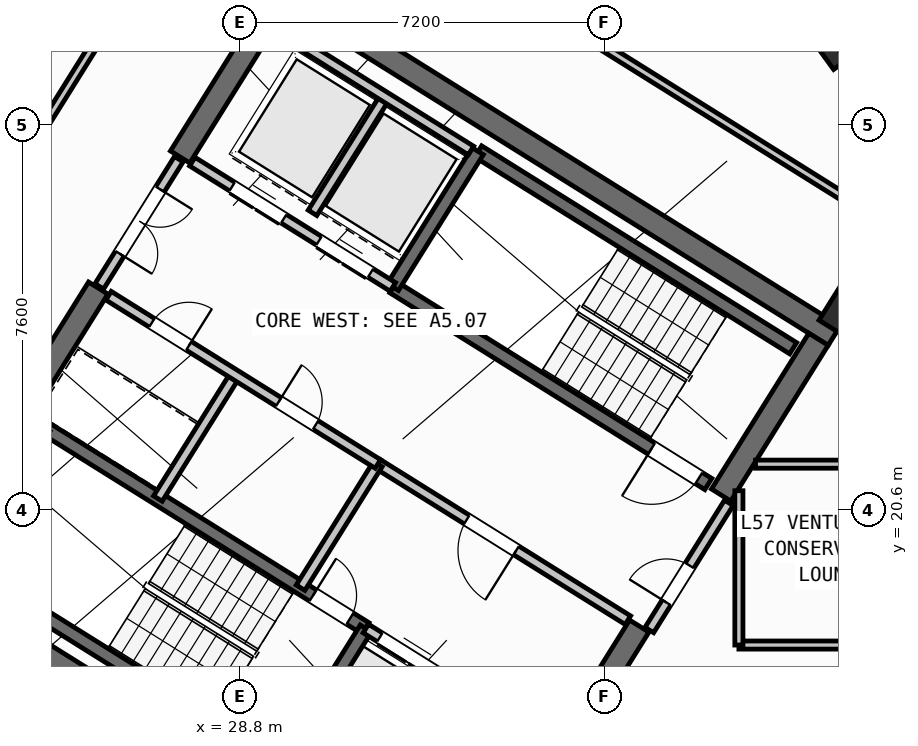
"""IFC4 building model, lengths in metres.
Left out: names, types, materials, properties, quantities, classifications, styles, units other than length and angle.
Written with IfcOpenShell. Run it as: python <this file> out.ifc"""

import sys

from ifc_helpers import new_model, si_unit, direction, frame, frame_2d, origin, origin_2d, place, context, subcontext, project, spatial, rectangle, hollow_rectangle, i_section, extrude, source, transform, mapped, element, fill, save


model = new_model("IFC4")
c1 = context("Model", 3, precision=1e-05, world=origin(), true_north=direction((0.0, 1.0)))
c2 = subcontext(c1, "Body", "Model", "MODEL_VIEW")
j1 = project(units=[si_unit("LENGTHUNIT", "METRE"), si_unit("PLANEANGLEUNIT", "RADIAN")], contexts=[c1])
p1 = place(None, origin())
s1 = spatial("IfcSite", under=j1, at=p1, CompositionType="ELEMENT")
p2 = place(p1, origin())
s2 = spatial("IfcBuilding", under=s1, at=p2, CompositionType="ELEMENT")
p3 = place(p2, frame((0.0, 0.0, 225.6)))
s3 = spatial("IfcBuildingStorey", under=s2, at=p3, CompositionType="ELEMENT", Elevation=225.6)
p4 = place(p3, frame((40.531, 24.036, 0.0), z_axis=(0.0, 0.0, 1.0), x_axis=(-0.848048787466, 0.529918157905, 0.0)))
e1 = element("IfcWall", 1, at=p4, inside=s3, PredefinedType="SHEAR", context=c2, shape_type="SweptSolid", body=[
    extrude(rectangle(XDim=13.04, YDim=0.45, at=frame_2d((6.52, 0.0))), origin(), (0.0, 0.0, 1.0), 3.35),
])
p5 = place(p3, frame((33.324, 12.503, 0.0), z_axis=(0.0, 0.0, 1.0), x_axis=(-0.848043529849, 0.529926571782, 0.0)))
e2 = element("IfcWall", 2, at=p5, inside=s3, PredefinedType="SHEAR", context=c2, shape_type="SweptSolid", body=[
    extrude(rectangle(XDim=13.04, YDim=0.45, at=frame_2d((6.52, 0.0))), origin(), (0.0, 0.0, 1.0), 3.35),
])
p6 = place(p3, frame((40.221, 23.965, 0.0), z_axis=(0.0, 0.0, 1.0), x_axis=(-0.529902075036, -0.848058836916, 0.0)))
e3 = element("IfcWall", 3, at=p6, inside=s3, PredefinedType="SHEAR", context=c2, shape_type="SweptSolid", body=[
    extrude(rectangle(XDim=3.625, YDim=0.45, at=frame_2d((1.812, 0.0))), origin(), (0.0, 0.0, 1.0), 3.35),
])
p7 = place(p3, frame((36.683, 18.304, 0.0), z_axis=(0.0, 0.0, 1.0), x_axis=(-0.529904039071, -0.848057609704, 0.0)))
e4 = element("IfcWall", 4, at=p7, inside=s3, PredefinedType="SHEAR", context=c2, shape_type="SweptSolid", body=[
    extrude(rectangle(XDim=6.475, YDim=0.45, at=frame_2d((3.238, 0.0))), origin(), (0.0, 0.0, 1.0), 3.35),
])
p8 = place(p3, frame((29.544, 30.636, 0.0), z_axis=(0.0, 0.0, 1.0), x_axis=(-0.529902075036, -0.848058836916, 0.0)))
e5 = element("IfcWall", 5, at=p8, inside=s3, PredefinedType="SHEAR", context=c2, shape_type="SweptSolid", body=[
    extrude(rectangle(XDim=3.625, YDim=0.45, at=frame_2d((1.812, 0.0))), origin(), (0.0, 0.0, 1.0), 3.35),
])
p9 = place(p3, frame((26.007, 24.976, 0.0), z_axis=(0.0, 0.0, 1.0), x_axis=(-0.529931155655, -0.848040665456, 0.0)))
e6 = element("IfcWall", 6, at=p9, inside=s3, PredefinedType="SHEAR", context=c2, shape_type="SweptSolid", body=[
    extrude(rectangle(XDim=6.475, YDim=0.45, at=frame_2d((3.238, 0.0))), origin(), (0.0, 0.0, 1.0), 3.35),
])
m1 = source(origin(), c2, "Body", "SweptSolid", [
    extrude(hollow_rectangle(XDim=0.8, YDim=0.8, WallThickness=0.032, at=origin_2d()), origin(), (0.0, 0.0, 1.0), 3.6),
])
p10 = place(p3, frame((40.783, 24.469, 0.0), z_axis=(0.0, 0.0, 1.0), x_axis=(-0.848048096156, 0.529919264233, 0.0)))
e7 = element("IfcColumn", 7, at=p10, inside=s3, PredefinedType="COLUMN", context=c2, shape_type="MappedRepresentation", body=[
    mapped(m1, transform((0.0, 0.0, 0.0), scale=1.0)),
])
m2 = source(origin(), c2, "Body", "SweptSolid", [
    extrude(i_section(OverallWidth=0.3, OverallDepth=0.55, WebThickness=0.015, FlangeThickness=0.029, at=origin_2d()), origin(), (0.0, 0.0, 1.0), 3.6),
])
p11 = place(p3, frame((40.479, 29.601, 0.0), z_axis=(0.0, 0.0, 1.0), x_axis=(0.809016994375, 0.587785252292, 0.0)))
e8 = element("IfcColumn", 8, at=p11, inside=s3, PredefinedType="COLUMN", context=c2, shape_type="MappedRepresentation", body=[
    mapped(m2, transform((0.0, 0.0, 0.0), scale=1.0)),
])
p12 = place(p3, frame((31.76, 12.183, 0.0), z_axis=(0.0, 0.0, 1.0), x_axis=(-0.848047074256, 0.529920899612, 0.0)))
e9 = element("IfcWall", 9, at=p12, inside=s3, PredefinedType="STANDARD", context=c2, shape_type="SweptSolid", body=[
    extrude(rectangle(XDim=30.652, YDim=0.32, at=frame_2d((15.326, 0.0))), origin(), (0.0, 0.0, 1.0), 3.35),
])
p13 = place(p12, frame((15.166, 0.0, 0.0)))
e10 = element("IfcOpeningElement", 10, at=p13, cuts=e9, PredefinedType="OPENING", context=c2, shape_type="SweptSolid", body=[
    extrude(rectangle(XDim=1.2, YDim=2.15, at=frame_2d((0.6, 1.075))), frame((0.0, 0.17, 0.0), z_axis=(0.0, -1.0, 0.0), x_axis=(1.0, 0.0, 0.0)), (0.0, 0.0, 1.0), 0.34),
])
p14 = place(p12, frame((2.24, 0.0, 0.9)))
e11 = element("IfcOpeningElement", 11, at=p14, cuts=e9, PredefinedType="OPENING", context=c2, shape_type="SweptSolid", body=[
    extrude(rectangle(XDim=1.65, YDim=1.45, at=frame_2d((0.825, 0.725))), frame((0.0, 0.17, 0.0), z_axis=(0.0, -1.0, 0.0), x_axis=(1.0, 0.0, 0.0)), (0.0, 0.0, 1.0), 0.34),
])
p15 = place(p12, frame((7.469, 0.0, 0.9)))
e12 = element("IfcOpeningElement", 12, at=p15, cuts=e9, PredefinedType="OPENING", context=c2, shape_type="SweptSolid", body=[
    extrude(rectangle(XDim=1.65, YDim=1.45, at=frame_2d((0.825, 0.725))), frame((0.0, 0.17, 0.0), z_axis=(0.0, -1.0, 0.0), x_axis=(1.0, 0.0, 0.0)), (0.0, 0.0, 1.0), 0.34),
])
p16 = place(p12, frame((12.623, 0.0, 1.0)))
e13 = element("IfcOpeningElement", 13, at=p16, cuts=e9, PredefinedType="OPENING", context=c2, shape_type="SweptSolid", body=[
    extrude(rectangle(XDim=0.9, YDim=1.25, at=frame_2d((0.45, 0.625))), frame((0.0, 0.17, 0.0), z_axis=(0.0, -1.0, 0.0), x_axis=(1.0, 0.0, 0.0)), (0.0, 0.0, 1.0), 0.34),
])
p17 = place(p12, frame((19.556, 0.0, 1.0)))
e14 = element("IfcOpeningElement", 14, at=p17, cuts=e9, PredefinedType="OPENING", context=c2, shape_type="SweptSolid", body=[
    extrude(rectangle(XDim=0.9, YDim=1.25, at=frame_2d((0.45, 0.625))), frame((0.0, 0.17, 0.0), z_axis=(0.0, -1.0, 0.0), x_axis=(1.0, 0.0, 0.0)), (0.0, 0.0, 1.0), 0.34),
])
p18 = place(p12, frame((21.95, 0.0, 1.0)))
e15 = element("IfcOpeningElement", 15, at=p18, cuts=e9, PredefinedType="OPENING", context=c2, shape_type="SweptSolid", body=[
    extrude(rectangle(XDim=0.9, YDim=1.25, at=frame_2d((0.45, 0.625))), frame((0.0, 0.17, 0.0), z_axis=(0.0, -1.0, 0.0), x_axis=(1.0, 0.0, 0.0)), (0.0, 0.0, 1.0), 0.34),
])
p19 = place(p12, frame((26.983, 0.0, 0.9)))
e16 = element("IfcOpeningElement", 16, at=p19, cuts=e9, PredefinedType="OPENING", context=c2, shape_type="SweptSolid", body=[
    extrude(rectangle(XDim=1.35, YDim=1.45, at=frame_2d((0.675, 0.725))), frame((0.0, 0.17, 0.0), z_axis=(0.0, -1.0, 0.0), x_axis=(1.0, 0.0, 0.0)), (0.0, 0.0, 1.0), 0.34),
])
p20 = place(p3, frame((29.605, 15.581, 0.0), z_axis=(0.0, 0.0, 1.0), x_axis=(-0.848036911448, 0.529937163087, 0.0)))
e17 = element("IfcWall", 17, at=p20, inside=s3, PredefinedType="SHEAR", context=c2, shape_type="SweptSolid", body=[
    extrude(rectangle(XDim=7.46, YDim=0.26, at=frame_2d((3.73, 0.0))), origin(), (0.0, 0.0, 1.0), 3.35),
])
p21 = place(p3, frame((31.28, 18.261, 0.0), z_axis=(0.0, 0.0, 1.0), x_axis=(-0.848051618787, 0.529913626805, 0.0)))
e18 = element("IfcWall", 18, at=p21, inside=s3, PredefinedType="SHEAR", context=c2, shape_type="SweptSolid", body=[
    extrude(rectangle(XDim=7.46, YDim=0.26, at=frame_2d((3.73, 0.0))), origin(), (0.0, 0.0, 1.0), 3.35),
])
p22 = place(p21, frame((0.36, 0.0, 0.0)))
e19 = element("IfcOpeningElement", 19, at=p22, cuts=e18, PredefinedType="OPENING", context=c2, shape_type="SweptSolid", body=[
    extrude(rectangle(XDim=0.86, YDim=2.05, at=frame_2d((0.43, 1.025))), frame((0.0, 0.14, 0.0), z_axis=(0.0, -1.0, 0.0), x_axis=(1.0, 0.0, 0.0)), (0.0, 0.0, 1.0), 0.28),
])
p23 = place(p3, frame((31.288, 18.256, 0.0), z_axis=(0.0, 0.0, 1.0), x_axis=(-0.529943379326, -0.848033026897, 0.0)))
e20 = element("IfcWall", 20, at=p23, inside=s3, PredefinedType="SHEAR", context=c2, shape_type="SweptSolid", body=[
    extrude(rectangle(XDim=3.16, YDim=0.26, at=frame_2d((1.58, 0.0))), origin(), (0.0, 0.0, 1.0), 3.35),
])
p24 = place(p3, frame((39.721, 23.788, 0.0), z_axis=(0.0, 0.0, 1.0), x_axis=(-0.848054434086, 0.529909121291, 0.0)))
e21 = element("IfcWall", 21, at=p24, inside=s3, PredefinedType="SHEAR", context=c2, shape_type="SweptSolid", body=[
    extrude(rectangle(XDim=7.33, YDim=0.26, at=frame_2d((3.665, 0.0))), origin(), (0.0, 0.0, 1.0), 3.35),
])
p25 = place(p3, frame((38.046, 21.108, 0.0), z_axis=(0.0, 0.0, 1.0), x_axis=(-0.848054434086, 0.529909121291, 0.0)))
e22 = element("IfcWall", 22, at=p25, inside=s3, PredefinedType="SHEAR", context=c2, shape_type="SweptSolid", body=[
    extrude(rectangle(XDim=7.33, YDim=0.26, at=frame_2d((3.665, 0.0))), origin(), (0.0, 0.0, 1.0), 3.35),
])
p26 = place(p25, frame((0.22, 0.0, 0.0)))
e23 = element("IfcOpeningElement", 23, at=p26, cuts=e22, PredefinedType="OPENING", context=c2, shape_type="SweptSolid", body=[
    extrude(rectangle(XDim=1.1, YDim=2.1, at=frame_2d((0.55, 1.05))), frame((0.0, 0.14, 0.0), z_axis=(0.0, -1.0, 0.0), x_axis=(1.0, 0.0, 0.0)), (0.0, 0.0, 1.0), 0.28),
])
p27 = place(p3, frame((33.496, 27.677, 0.0), z_axis=(0.0, 0.0, 1.0), x_axis=(-0.529908658664, -0.84805472316, 0.0)))
e24 = element("IfcWall", 24, at=p27, inside=s3, PredefinedType="SHEAR", context=c2, shape_type="SweptSolid", body=[
    extrude(rectangle(XDim=3.16, YDim=0.26, at=frame_2d((1.58, 0.0))), origin(), (0.0, 0.0, 1.0), 3.35),
])
p28 = place(p3, frame((34.933, 15.978, 0.0), z_axis=(0.0, 0.0, 1.0), x_axis=(-0.848055739377, 0.529907032327, 0.0)))
e25 = element("IfcWall", 25, at=p28, inside=s3, PredefinedType="STANDARD", context=c2, shape_type="SweptSolid", body=[
    extrude(rectangle(XDim=4.298, YDim=0.2, at=frame_2d((2.149, 0.0))), origin(), (0.0, 0.0, 1.0), 3.34),
])
p29 = place(p28, frame((0.448, 0.0, 0.0)))
e26 = element("IfcOpeningElement", 26, at=p29, cuts=e25, PredefinedType="OPENING", context=c2, shape_type="SweptSolid", body=[
    extrude(rectangle(XDim=1.3, YDim=2.2, at=frame_2d((0.65, 1.1))), frame((0.0, 0.11, 0.0), z_axis=(0.0, -1.0, 0.0), x_axis=(1.0, 0.0, 0.0)), (0.0, 0.0, 1.0), 0.22),
])
p30 = place(p28, frame((2.523, 0.0, 0.0)))
e27 = element("IfcOpeningElement", 27, at=p30, cuts=e25, PredefinedType="OPENING", context=c2, shape_type="SweptSolid", body=[
    extrude(rectangle(XDim=1.45, YDim=2.25, at=frame_2d((0.725, 1.125))), frame((0.0, 0.11, 0.0), z_axis=(0.0, -1.0, 0.0), x_axis=(1.0, 0.0, 0.0)), (0.0, 0.0, 1.0), 0.22),
])
p31 = place(p3, frame((36.459, 18.421, 0.0), z_axis=(0.0, 0.0, 1.0), x_axis=(-0.848059591691, 0.529900867089, 0.0)))
e28 = element("IfcWall", 28, at=p31, inside=s3, PredefinedType="STANDARD", context=c2, shape_type="SweptSolid", body=[
    extrude(rectangle(XDim=5.818, YDim=0.2, at=frame_2d((2.909, 0.0))), origin(), (0.0, 0.0, 1.0), 3.34),
])
p32 = place(p31, frame((2.598, 0.0, 0.0)))
e29 = element("IfcOpeningElement", 29, at=p32, cuts=e28, PredefinedType="OPENING", context=c2, shape_type="SweptSolid", body=[
    extrude(rectangle(XDim=1.15, YDim=2.1, at=frame_2d((0.575, 1.05))), frame((0.0, 0.11, 0.0), z_axis=(0.0, -1.0, 0.0), x_axis=(1.0, 0.0, 0.0)), (0.0, 0.0, 1.0), 0.22),
])
p33 = place(p3, frame((31.822, 24.998, 0.0), z_axis=(0.0, 0.0, 1.0), x_axis=(-0.848054125777, 0.529909614701, 0.0)))
e30 = element("IfcWall", 30, at=p33, inside=s3, PredefinedType="STANDARD", context=c2, shape_type="SweptSolid", body=[
    extrude(rectangle(XDim=4.668, YDim=0.2, at=frame_2d((2.334, 0.0))), origin(), (0.0, 0.0, 1.0), 3.34),
])
p34 = place(p33, frame((0.52, 0.0, 0.0)))
e31 = element("IfcOpeningElement", 31, at=p34, cuts=e30, PredefinedType="OPENING", context=c2, shape_type="SweptSolid", body=[
    extrude(rectangle(XDim=1.2, YDim=2.15, at=frame_2d((0.6, 1.075))), frame((0.0, 0.11, 0.0), z_axis=(0.0, -1.0, 0.0), x_axis=(1.0, 0.0, 0.0)), (0.0, 0.0, 1.0), 0.22),
])
p35 = place(p33, frame((2.54, 0.0, 0.0)))
e32 = element("IfcOpeningElement", 32, at=p35, cuts=e30, PredefinedType="OPENING", context=c2, shape_type="SweptSolid", body=[
    extrude(rectangle(XDim=1.2, YDim=2.15, at=frame_2d((0.6, 1.075))), frame((0.0, 0.11, 0.0), z_axis=(0.0, -1.0, 0.0), x_axis=(1.0, 0.0, 0.0)), (0.0, 0.0, 1.0), 0.22),
])
p36 = place(p3, frame((31.645, 28.716, 0.0), z_axis=(0.0, 0.0, 1.0), x_axis=(-0.52986693015, -0.848080795876, 0.0)))
e33 = element("IfcWall", 33, at=p36, inside=s3, PredefinedType="STANDARD", context=c2, shape_type="SweptSolid", body=[
    extrude(rectangle(XDim=2.66, YDim=0.2, at=frame_2d((1.33, 0.0))), origin(), (0.0, 0.0, 1.0), 3.34),
])
p37 = place(p3, frame((33.363, 27.69, 0.0), z_axis=(0.0, 0.0, 1.0), x_axis=(-0.84804957148, 0.529916903215, 0.0)))
e34 = element("IfcWall", 34, at=p37, inside=s3, PredefinedType="STANDARD", context=c2, shape_type="SweptSolid", body=[
    extrude(rectangle(XDim=4.548, YDim=0.2, at=frame_2d((2.274, 0.0))), origin(), (0.0, 0.0, 1.0), 3.34),
])
for number, where, z_axis, x_axis in (
    (35, (31.525, 21.504, 0.0), (0.0, 0.0, 1.0), (-0.53, -0.848, 0.0)),
    (36, (28.71, 23.263, 0.0), (0.0, 0.0, 1.0), (-0.53, -0.848, 0.0)),
):
    element("IfcWall", number, at=place(p3, frame(where, z_axis=z_axis, x_axis=x_axis)), inside=s3, PredefinedType="STANDARD", context=c2, shape_type="SweptSolid", body=[
        extrude(rectangle(XDim=2.88, YDim=0.2, at=frame_2d((1.44, 0.0))), origin(), (0.0, 0.0, 1.0), 3.34),
    ])
p38 = place(p3, frame((31.525, 21.504, 0.0), z_axis=(0.0, 0.0, 1.0), x_axis=(-0.848042066329, 0.529928913853, 0.0)))
e37 = element("IfcWall", 37, at=p38, inside=s3, PredefinedType="STANDARD", context=c2, shape_type="SweptSolid", body=[
    extrude(rectangle(XDim=6.268, YDim=0.2, at=frame_2d((3.134, 0.0))), origin(), (0.0, 0.0, 1.0), 3.34),
])
p39 = place(p38, frame((4.4, 0.0, 0.0)))
e38 = element("IfcOpeningElement", 38, at=p39, cuts=e37, PredefinedType="OPENING", context=c2, shape_type="SweptSolid", body=[
    extrude(rectangle(XDim=0.86, YDim=2.05, at=frame_2d((0.43, 1.025))), frame((0.0, 0.11, 0.0), z_axis=(0.0, -1.0, 0.0), x_axis=(1.0, 0.0, 0.0)), (0.0, 0.0, 1.0), 0.22),
])
p40 = place(p38, frame((1.45, 0.0, 0.0)))
e39 = element("IfcOpeningElement", 39, at=p40, cuts=e37, PredefinedType="OPENING", context=c2, shape_type="SweptSolid", body=[
    extrude(rectangle(XDim=0.86, YDim=2.05, at=frame_2d((0.43, 1.025))), frame((0.0, 0.11, 0.0), z_axis=(0.0, -1.0, 0.0), x_axis=(1.0, 0.0, 0.0)), (0.0, 0.0, 1.0), 0.22),
])
p41 = place(p3, frame((27.596, 27.52, 0.0), z_axis=(0.0, 0.0, 1.0), x_axis=(-0.529865479138, -0.848081702443, 0.0)))
e40 = element("IfcWall", 40, at=p41, inside=s3, PredefinedType="STANDARD", context=c2, shape_type="SweptSolid", body=[
    extrude(rectangle(XDim=2.96, YDim=0.2, at=frame_2d((1.48, 0.0))), origin(), (0.0, 0.0, 1.0), 3.34),
])
p42 = place(p41, frame((0.7, 0.0, 0.0)))
e41 = element("IfcOpeningElement", 41, at=p42, cuts=e40, PredefinedType="OPENING", context=c2, shape_type="SweptSolid", body=[
    extrude(rectangle(XDim=1.5, YDim=2.15, at=frame_2d((0.75, 1.075))), frame((0.0, 0.11, 0.0), z_axis=(0.0, -1.0, 0.0), x_axis=(1.0, 0.0, 0.0)), (0.0, 0.0, 1.0), 0.22),
])
p43 = place(p3, frame((31.239, 38.274, 0.0), z_axis=(0.0, 0.0, 1.0), x_axis=(-0.529921796515, -0.848046513806, 0.0)))
e42 = element("IfcWall", 42, at=p43, inside=s3, PredefinedType="PARTITIONING", context=c2, shape_type="SweptSolid", body=[
    extrude(rectangle(XDim=16.5, YDim=0.16, at=frame_2d((8.25, 0.0))), origin(), (0.0, 0.0, 1.0), 3.34),
])
p44 = place(p3, frame((41.936, 26.012, 0.0), z_axis=(0.0, 0.0, 1.0), x_axis=(-0.848051154596, 0.529914369676, 0.0)))
e43 = element("IfcWall", 43, at=p44, inside=s3, PredefinedType="PARTITIONING", context=c2, shape_type="SweptSolid", body=[
    extrude(rectangle(XDim=15.57, YDim=0.16, at=frame_2d((7.785, 0.0))), origin(), (0.0, 0.0, 1.0), 3.34),
])
p45 = place(p44, frame((10.83, 0.0, 0.0)))
e44 = element("IfcOpeningElement", 44, at=p45, cuts=e43, PredefinedType="OPENING", context=c2, shape_type="SweptSolid", body=[
    extrude(rectangle(XDim=1.0, YDim=2.1, at=frame_2d((0.5, 1.05))), frame((0.0, 0.09, 0.0), z_axis=(0.0, -1.0, 0.0), x_axis=(1.0, 0.0, 0.0)), (0.0, 0.0, 1.0), 0.18),
])
p46 = place(p3, frame((42.226, 28.873, 0.0), z_axis=(0.0, 0.0, 1.0), x_axis=(-0.848049134363, 0.529917602752, 0.0)))
e45 = element("IfcWall", 45, at=p46, inside=s3, PredefinedType="PLUMBINGWALL", context=c2, shape_type="SweptSolid", body=[
    extrude(rectangle(XDim=14.3, YDim=0.14, at=frame_2d((7.15, 0.0))), origin(), (0.0, 0.0, 1.0), 3.34),
])
p47 = place(p46, frame((9.57, 0.0, 0.0)))
e46 = element("IfcOpeningElement", 46, at=p47, cuts=e45, PredefinedType="OPENING", context=c2, shape_type="SweptSolid", body=[
    extrude(rectangle(XDim=0.92, YDim=2.08, at=frame_2d((0.46, 1.04))), frame((0.0, 0.08, 0.0), z_axis=(0.0, -1.0, 0.0), x_axis=(1.0, 0.0, 0.0)), (0.0, 0.0, 1.0), 0.16),
])
p48 = place(p3, frame((38.451, 20.737, 0.0), z_axis=(0.0, 0.0, 1.0), x_axis=(-0.529924799939, -0.848044637038, 0.0)))
e47 = element("IfcWall", 47, at=p48, inside=s3, PredefinedType="STANDARD", context=c2, shape_type="SweptSolid", body=[
    extrude(rectangle(XDim=2.96, YDim=0.2, at=frame_2d((1.48, 0.0))), origin(), (0.0, 0.0, 1.0), 3.34),
])
p49 = place(p48, frame((1.46, 0.0, 0.0)))
e48 = element("IfcOpeningElement", 48, at=p49, cuts=e47, PredefinedType="OPENING", context=c2, shape_type="SweptSolid", body=[
    extrude(rectangle(XDim=0.86, YDim=2.05, at=frame_2d((0.43, 1.025))), frame((0.0, 0.11, 0.0), z_axis=(0.0, -1.0, 0.0), x_axis=(1.0, 0.0, 0.0)), (0.0, 0.0, 1.0), 0.22),
])
p50 = place(p3, frame((38.65, 17.93, 0.0), z_axis=(0.0, 0.0, 1.0), x_axis=(1.0, 0.0, 0.0)))
e49 = element("IfcWall", 49, at=p50, inside=s3, PredefinedType="PARTITIONING", context=c2, shape_type="SweptSolid", body=[
    extrude(rectangle(XDim=9.95, YDim=0.16, at=frame_2d((4.975, 0.0))), origin(), (0.0, 0.0, 1.0), 3.34),
])
p51 = place(p50, frame((4.475, 0.0, 0.0)))
e50 = element("IfcOpeningElement", 50, at=p51, cuts=e49, PredefinedType="OPENING", context=c2, shape_type="SweptSolid", body=[
    extrude(rectangle(XDim=1.0, YDim=2.1, at=frame_2d((0.5, 1.05))), frame((0.0, 0.09, 0.0), z_axis=(0.0, -1.0, 0.0), x_axis=(1.0, 0.0, 0.0)), (0.0, 0.0, 1.0), 0.18),
])
p52 = place(p3, frame((38.65, 17.93, 0.0), z_axis=(0.0, 0.0, 1.0), x_axis=(0.0, 1.0, 0.0)))
e51 = element("IfcWall", 51, at=p52, inside=s3, PredefinedType="PARTITIONING", context=c2, shape_type="SweptSolid", body=[
    extrude(rectangle(XDim=3.046, YDim=0.16, at=frame_2d((1.523, 0.0))), origin(), (0.0, 0.0, 1.0), 3.34),
])
p53 = place(p3, frame((38.978, 21.5, 0.0), z_axis=(0.0, 0.0, 1.0), x_axis=(1.0, 0.0, 0.0)))
e52 = element("IfcWall", 52, at=p53, inside=s3, PredefinedType="PARTITIONING", context=c2, shape_type="SweptSolid", body=[
    extrude(rectangle(XDim=7.336, YDim=0.16, at=frame_2d((3.668, 0.0))), origin(), (0.0, 0.0, 1.0), 3.34),
])
m3 = source(origin(), c2, "Body", "SweptSolid", [
    extrude(rectangle(XDim=0.86, YDim=2.05, at=frame_2d((0.43, 1.025))), frame((0.0, 0.025, 0.0), z_axis=(0.0, -1.0, 0.0), x_axis=(1.0, 0.0, 0.0)), (0.0, 0.0, 1.0), 0.05),
])
p54 = place(p22, frame((0.86, 0.0, 0.0), z_axis=(0.0, 0.0, 1.0), x_axis=(-1.0, 0.0, 0.0)))
e53 = element("IfcDoor", 53, at=p54, inside=s3, OperationType="SINGLE_SWING_LEFT", PredefinedType="DOOR", context=c2, shape_type="MappedRepresentation", body=[
    mapped(m3, transform((0.0, 0.0, 0.0), scale=1.0)),
])
fill(e19, e53)
m4 = source(origin(), c2, "Body", "SweptSolid", [
    extrude(rectangle(XDim=1.1, YDim=2.1, at=frame_2d((0.55, 1.05))), frame((0.0, 0.025, 0.0), z_axis=(0.0, -1.0, 0.0), x_axis=(1.0, 0.0, 0.0)), (0.0, 0.0, 1.0), 0.05),
])
p55 = place(p26, origin())
e54 = element("IfcDoor", 54, at=p55, inside=s3, OperationType="SINGLE_SWING_RIGHT", PredefinedType="DOOR", context=c2, shape_type="MappedRepresentation", body=[
    mapped(m4, transform((0.0, 0.0, 0.0), scale=1.0)),
])
fill(e23, e54)
m5 = source(origin(), c2, "Body", "SweptSolid", [
    extrude(rectangle(XDim=1.15, YDim=2.1, at=frame_2d((0.575, 1.05))), frame((0.0, 0.025, 0.0), z_axis=(0.0, -1.0, 0.0), x_axis=(1.0, 0.0, 0.0)), (0.0, 0.0, 1.0), 0.05),
])
p56 = place(p32, origin())
e55 = element("IfcDoor", 55, at=p56, inside=s3, OperationType="SINGLE_SWING_LEFT", PredefinedType="DOOR", context=c2, shape_type="MappedRepresentation", body=[
    mapped(m5, transform((0.0, 0.0, 0.0), scale=1.0)),
])
fill(e29, e55)
m6 = source(origin(), c2, "Body", "SweptSolid", [
    extrude(rectangle(XDim=1.45, YDim=2.25, at=frame_2d((0.725, 1.125))), frame((0.0, 0.025, 0.0), z_axis=(0.0, -1.0, 0.0), x_axis=(1.0, 0.0, 0.0)), (0.0, 0.0, 1.0), 0.05),
])
p57 = place(p30, origin())
e56 = element("IfcDoor", 56, at=p57, inside=s3, OperationType="DOUBLE_DOOR_SLIDING", PredefinedType="DOOR", context=c2, shape_type="MappedRepresentation", body=[
    mapped(m6, transform((0.0, 0.0, 0.0), scale=1.0)),
])
fill(e27, e56)
m7 = source(origin(), c2, "Body", "SweptSolid", [
    extrude(rectangle(XDim=1.2, YDim=2.15, at=frame_2d((0.6, 1.075))), frame((0.0, 0.025, 0.0), z_axis=(0.0, -1.0, 0.0), x_axis=(1.0, 0.0, 0.0)), (0.0, 0.0, 1.0), 0.05),
])
p58 = place(p34, origin())
e57 = element("IfcDoor", 57, at=p58, inside=s3, OperationType="DOUBLE_DOOR_SLIDING", PredefinedType="DOOR", context=c2, shape_type="MappedRepresentation", body=[
    mapped(m7, transform((0.0, 0.0, 0.0), scale=1.0)),
])
fill(e31, e57)
p59 = place(p35, origin())
e58 = element("IfcDoor", 58, at=p59, inside=s3, OperationType="DOUBLE_DOOR_SLIDING", PredefinedType="DOOR", context=c2, shape_type="MappedRepresentation", body=[
    mapped(m7, transform((0.0, 0.0, 0.0), scale=1.0)),
])
fill(e32, e58)
p60 = place(p39, frame((0.86, 0.0, 0.0), z_axis=(0.0, 0.0, 1.0), x_axis=(-1.0, 0.0, 0.0)))
e59 = element("IfcDoor", 59, at=p60, inside=s3, OperationType="SINGLE_SWING_RIGHT", PredefinedType="DOOR", context=c2, shape_type="MappedRepresentation", body=[
    mapped(m3, transform((0.0, 0.0, 0.0), scale=1.0)),
])
fill(e38, e59)
p61 = place(p40, frame((0.86, 0.0, 0.0), z_axis=(0.0, 0.0, 1.0), x_axis=(-1.0, 0.0, 0.0)))
e60 = element("IfcDoor", 60, at=p61, inside=s3, OperationType="SINGLE_SWING_LEFT", PredefinedType="DOOR", context=c2, shape_type="MappedRepresentation", body=[
    mapped(m3, transform((0.0, 0.0, 0.0), scale=1.0)),
])
fill(e39, e60)
m8 = source(origin(), c2, "Body", "SweptSolid", [
    extrude(rectangle(XDim=1.5, YDim=2.15, at=frame_2d((0.75, 1.075))), frame((0.0, 0.025, 0.0), z_axis=(0.0, -1.0, 0.0), x_axis=(1.0, 0.0, 0.0)), (0.0, 0.0, 1.0), 0.05),
])
p62 = place(p42, origin())
e61 = element("IfcDoor", 61, at=p62, inside=s3, OperationType="DOUBLE_DOOR_SINGLE_SWING", PredefinedType="DOOR", context=c2, shape_type="MappedRepresentation", body=[
    mapped(m8, transform((0.0, 0.0, 0.0), scale=1.0)),
])
fill(e41, e61)
p63 = place(p49, frame((0.86, 0.0, 0.0), z_axis=(0.0, 0.0, 1.0), x_axis=(-1.0, 0.0, 0.0)))
e62 = element("IfcDoor", 62, at=p63, inside=s3, OperationType="SINGLE_SWING_LEFT", PredefinedType="DOOR", context=c2, shape_type="MappedRepresentation", body=[
    mapped(m3, transform((0.0, 0.0, 0.0), scale=1.0)),
])
fill(e48, e62)
save(model, sys.argv[1])
